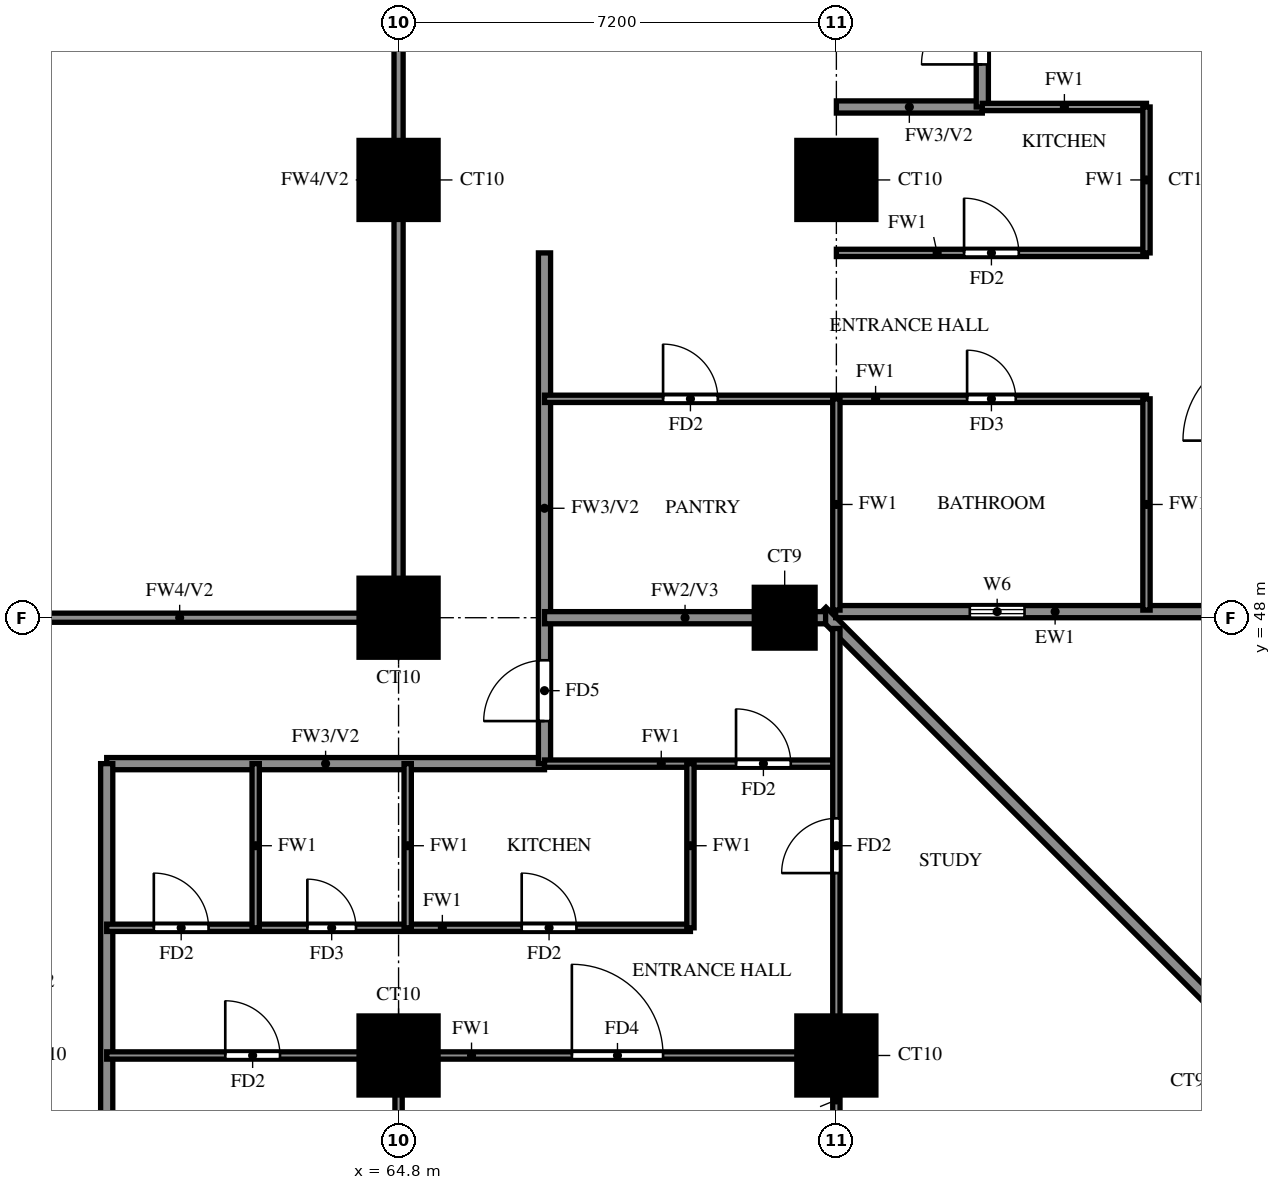
"""IFC4 building model, lengths in metres.
Left out: names, types, materials, properties, quantities, classifications, styles, units other than length and angle.
Written with IfcOpenShell. Run it as: python <this file> out.ifc"""

import sys

from ifc_helpers import new_model, si_unit, direction, frame, frame_2d, origin, origin_2d, place, context, subcontext, project, spatial, rectangle, extrude, source, transform, mapped, element, fill, save


model = new_model("IFC4")
c1 = context("Model", 3, precision=1e-05, world=origin(), true_north=direction((0.0, 1.0)))
c2 = subcontext(c1, "Body", "Model", "MODEL_VIEW")
j1 = project(units=[si_unit("LENGTHUNIT", "METRE"), si_unit("PLANEANGLEUNIT", "RADIAN")], contexts=[c1])
p1 = place(None, origin())
s1 = spatial("IfcSite", under=j1, at=p1, CompositionType="ELEMENT")
p2 = place(p1, origin())
s2 = spatial("IfcBuilding", under=s1, at=p2, CompositionType="ELEMENT")
p3 = place(p2, frame((0.0, 0.0, 86.5)))
s3 = spatial("IfcBuildingStorey", under=s2, at=p3, CompositionType="ELEMENT", Elevation=86.5)
m1 = source(origin(), c2, "Body", "SweptSolid", [
    extrude(rectangle(XDim=1.3, YDim=1.3, at=origin_2d()), origin(), (0.0, 0.0, 1.0), 3.18),
])
for number, where, z_axis, x_axis in (
    (1, (64.8, 40.8, 0.0), (0.0, 0.0, 1.0), (1.0, 0.0, 0.0)),
    (2, (72.0, 40.8, 0.0), (0.0, 0.0, 1.0), (1.0, 0.0, 0.0)),
    (3, (64.8, 48.0, 0.0), (0.0, 0.0, 1.0), (1.0, 0.0, 0.0)),
):
    element("IfcColumn", number, at=place(p3, frame(where, z_axis=z_axis, x_axis=x_axis)), inside=s3, PredefinedType="COLUMN", context=c2, shape_type="MappedRepresentation", body=[
        mapped(m1, transform((0.0, 0.0, 0.0))),
    ])
m2 = source(origin(), c2, "Body", "SweptSolid", [
    extrude(rectangle(XDim=1.0, YDim=1.0, at=origin_2d()), origin(), (0.0, 0.0, 1.0), 3.18),
])
p4 = place(p3, frame((71.15, 48.0, 0.0), z_axis=(0.0, 0.0, 1.0), x_axis=(1.0, 0.0, 0.0)))
e4 = element("IfcColumn", 4, at=p4, inside=s3, PredefinedType="COLUMN", context=c2, shape_type="MappedRepresentation", body=[
    mapped(m2, transform((0.0, 0.0, 0.0))),
])
for number, where, z_axis, x_axis in (
    (5, (64.8, 55.2, 0.0), (0.0, 0.0, 1.0), (1.0, 0.0, 0.0)),
    (6, (72.0, 55.2, 0.0), (0.0, 0.0, 1.0), (1.0, 0.0, 0.0)),
):
    element("IfcColumn", number, at=place(p3, frame(where, z_axis=z_axis, x_axis=x_axis)), inside=s3, PredefinedType="COLUMN", context=c2, shape_type="MappedRepresentation", body=[
        mapped(m1, transform((0.0, 0.0, 0.0))),
    ])
p5 = place(p3, frame((85.996, 33.863, 0.0), z_axis=(0.0, 0.0, 1.0), x_axis=(-0.707100718496, 0.707112843825, 0.0)))
e7 = element("IfcWall", 7, at=p5, inside=s3, PredefinedType="SOLIDWALL", context=c2, shape_type="SweptSolid", body=[
    extrude(rectangle(XDim=20.135, YDim=0.2, at=frame_2d((10.067, 0.0))), origin(), (0.0, 0.0, 1.0), 3.18),
])
p6 = place(p3, frame((71.989, 48.1, 0.0), z_axis=(0.0, 0.0, 1.0), x_axis=(1.0, 0.0, 0.0)))
e8 = element("IfcWall", 8, at=p6, inside=s3, PredefinedType="SOLIDWALL", context=c2, shape_type="SweptSolid", body=[
    extrude(rectangle(XDim=6.562, YDim=0.2, at=frame_2d((3.281, 0.0))), origin(), (0.0, 0.0, 1.0), 3.18),
])
p7 = place(p6, frame((2.206, 0.0, 1.5)))
e9 = element("IfcOpeningElement", 9, at=p7, cuts=e8, PredefinedType="OPENING", context=c2, shape_type="SweptSolid", body=[
    extrude(rectangle(XDim=0.9, YDim=0.9, at=frame_2d((0.45, 0.45))), frame((0.0, 0.11, 0.0), z_axis=(0.0, -1.0, 0.0), x_axis=(1.0, 0.0, 0.0)), (0.0, 0.0, 1.0), 0.22),
])
p8 = place(p3, frame((60.0, 45.6, 0.0), z_axis=(0.0, 0.0, 1.0), x_axis=(1.0, 0.0, 0.0)))
e10 = element("IfcWall", 10, at=p8, inside=s3, PredefinedType="SOLIDWALL", context=c2, shape_type="SweptSolid", body=[
    extrude(rectangle(XDim=7.2, YDim=0.2, at=frame_2d((3.6, 0.0))), origin(), (0.0, 0.0, 1.0), 3.18),
])
p9 = place(p3, frame((72.0, 56.4, 0.0), z_axis=(0.0, 0.0, 1.0), x_axis=(1.0, 0.0, 0.0)))
e11 = element("IfcWall", 11, at=p9, inside=s3, PredefinedType="SOLIDWALL", context=c2, shape_type="SweptSolid", body=[
    extrude(rectangle(XDim=2.4, YDim=0.2, at=frame_2d((1.2, 0.0))), origin(), (0.0, 0.0, 1.0), 3.18),
])
p10 = place(p3, frame((60.0, 33.725, 0.0), z_axis=(0.0, 0.0, 1.0), x_axis=(0.0, 1.0, 0.0)))
e12 = element("IfcWall", 12, at=p10, inside=s3, PredefinedType="SOLIDWALL", context=c2, shape_type="SweptSolid", body=[
    extrude(rectangle(XDim=11.875, YDim=0.2, at=frame_2d((5.938, 0.0))), origin(), (0.0, 0.0, 1.0), 2.28),
])
p11 = place(p3, frame((67.2, 45.6, 0.0), z_axis=(0.0, 0.0, 1.0), x_axis=(0.0, 1.0, 0.0)))
e13 = element("IfcWall", 13, at=p11, inside=s3, PredefinedType="SOLIDWALL", context=c2, shape_type="SweptSolid", body=[
    extrude(rectangle(XDim=8.4, YDim=0.2, at=frame_2d((4.2, 0.0))), origin(), (0.0, 0.0, 1.0), 3.18),
])
p12 = place(p11, frame((0.7, 0.0, 0.0)))
e14 = element("IfcOpeningElement", 14, at=p12, cuts=e13, PredefinedType="OPENING", context=c2, shape_type="SweptSolid", body=[
    extrude(rectangle(XDim=1.0, YDim=2.1, at=frame_2d((0.5, 1.05))), frame((0.0, 0.11, 0.0), z_axis=(0.0, -1.0, 0.0), x_axis=(1.0, 0.0, 0.0)), (0.0, 0.0, 1.0), 0.22),
])
p13 = place(p3, frame((74.4, 56.4, 0.0), z_axis=(0.0, 0.0, 1.0), x_axis=(0.0, 1.0, 0.0)))
e15 = element("IfcWall", 15, at=p13, inside=s3, PredefinedType="SOLIDWALL", context=c2, shape_type="SweptSolid", body=[
    extrude(rectangle(XDim=9.6, YDim=0.2, at=frame_2d((4.8, 0.0))), origin(), (0.0, 0.0, 1.0), 3.18),
])
p14 = place(p13, frame((0.7, 0.0, 0.0)))
e16 = element("IfcOpeningElement", 16, at=p14, cuts=e15, PredefinedType="OPENING", context=c2, shape_type="SweptSolid", body=[
    extrude(rectangle(XDim=1.0, YDim=2.1, at=frame_2d((0.5, 1.05))), frame((0.0, 0.11, 0.0), z_axis=(0.0, -1.0, 0.0), x_axis=(1.0, 0.0, 0.0)), (0.0, 0.0, 1.0), 0.22),
])
p15 = place(p13, frame((3.1, 0.0, 0.0)))
e17 = element("IfcOpeningElement", 17, at=p15, cuts=e15, PredefinedType="OPENING", context=c2, shape_type="SweptSolid", body=[
    extrude(rectangle(XDim=1.0, YDim=2.1, at=frame_2d((0.5, 1.05))), frame((0.0, 0.11, 0.0), z_axis=(0.0, -1.0, 0.0), x_axis=(1.0, 0.0, 0.0)), (0.0, 0.0, 1.0), 0.22),
])
p16 = place(p3, frame((67.2, 48.0, 0.0), z_axis=(0.0, 0.0, 1.0), x_axis=(1.0, 0.0, 0.0)))
e18 = element("IfcWall", 18, at=p16, inside=s3, PredefinedType="SOLIDWALL", context=c2, shape_type="SweptSolid", body=[
    extrude(rectangle(XDim=4.623, YDim=0.2, at=frame_2d((2.312, 0.0))), origin(), (0.0, 0.0, 1.0), 3.18),
])
p17 = place(p3, frame((60.0, 40.8, 0.0), z_axis=(0.0, 0.0, 1.0), x_axis=(1.0, 0.0, 0.0)))
e19 = element("IfcWall", 19, at=p17, inside=s3, PredefinedType="PARTITIONING", context=c2, shape_type="SweptSolid", body=[
    extrude(rectangle(XDim=12.0, YDim=0.12, at=frame_2d((6.0, 0.0))), origin(), (0.0, 0.0, 1.0), 3.18),
])
p18 = place(p17, frame((7.65, 0.0, 0.0)))
e20 = element("IfcOpeningElement", 20, at=p18, cuts=e19, PredefinedType="OPENING", context=c2, shape_type="SweptSolid", body=[
    extrude(rectangle(XDim=1.5, YDim=2.1, at=frame_2d((0.75, 1.05))), frame((0.0, 0.07, 0.0), z_axis=(0.0, -1.0, 0.0), x_axis=(1.0, 0.0, 0.0)), (0.0, 0.0, 1.0), 0.14),
])
p19 = place(p17, frame((1.95, 0.0, 0.0)))
e21 = element("IfcOpeningElement", 21, at=p19, cuts=e19, PredefinedType="OPENING", context=c2, shape_type="SweptSolid", body=[
    extrude(rectangle(XDim=0.9, YDim=2.1, at=frame_2d((0.45, 1.05))), frame((0.0, 0.07, 0.0), z_axis=(0.0, -1.0, 0.0), x_axis=(1.0, 0.0, 0.0)), (0.0, 0.0, 1.0), 0.14),
])
p20 = place(p3, frame((60.0, 42.9, 0.0), z_axis=(0.0, 0.0, 1.0), x_axis=(1.0, 0.0, 0.0)))
e22 = element("IfcWall", 22, at=p20, inside=s3, PredefinedType="PARTITIONING", context=c2, shape_type="SweptSolid", body=[
    extrude(rectangle(XDim=9.6, YDim=0.12, at=frame_2d((4.8, 0.0))), origin(), (0.0, 0.0, 1.0), 3.18),
])
p21 = place(p20, frame((6.825, 0.0, 0.0)))
e23 = element("IfcOpeningElement", 23, at=p21, cuts=e22, PredefinedType="OPENING", context=c2, shape_type="SweptSolid", body=[
    extrude(rectangle(XDim=0.9, YDim=2.1, at=frame_2d((0.45, 1.05))), frame((0.0, 0.07, 0.0), z_axis=(0.0, -1.0, 0.0), x_axis=(1.0, 0.0, 0.0)), (0.0, 0.0, 1.0), 0.14),
])
p22 = place(p20, frame((3.3, 0.0, 0.0)))
e24 = element("IfcOpeningElement", 24, at=p22, cuts=e22, PredefinedType="OPENING", context=c2, shape_type="SweptSolid", body=[
    extrude(rectangle(XDim=0.8, YDim=2.1, at=frame_2d((0.4, 1.05))), frame((0.0, 0.07, 0.0), z_axis=(0.0, -1.0, 0.0), x_axis=(1.0, 0.0, 0.0)), (0.0, 0.0, 1.0), 0.14),
])
p23 = place(p20, frame((0.775, 0.0, 0.0)))
e25 = element("IfcOpeningElement", 25, at=p23, cuts=e22, PredefinedType="OPENING", context=c2, shape_type="SweptSolid", body=[
    extrude(rectangle(XDim=0.9, YDim=2.1, at=frame_2d((0.45, 1.05))), frame((0.0, 0.07, 0.0), z_axis=(0.0, -1.0, 0.0), x_axis=(1.0, 0.0, 0.0)), (0.0, 0.0, 1.0), 0.14),
])
p24 = place(p3, frame((67.2, 45.6, 0.0), z_axis=(0.0, 0.0, 1.0), x_axis=(1.0, 0.0, 0.0)))
e26 = element("IfcWall", 26, at=p24, inside=s3, PredefinedType="PARTITIONING", context=c2, shape_type="SweptSolid", body=[
    extrude(rectangle(XDim=4.8, YDim=0.12, at=frame_2d((2.4, 0.0))), origin(), (0.0, 0.0, 1.0), 3.18),
])
p25 = place(p24, frame((3.15, 0.0, 0.0)))
e27 = element("IfcOpeningElement", 27, at=p25, cuts=e26, PredefinedType="OPENING", context=c2, shape_type="SweptSolid", body=[
    extrude(rectangle(XDim=0.9, YDim=2.1, at=frame_2d((0.45, 1.05))), frame((0.0, 0.07, 0.0), z_axis=(0.0, -1.0, 0.0), x_axis=(1.0, 0.0, 0.0)), (0.0, 0.0, 1.0), 0.14),
])
p26 = place(p3, frame((67.2, 51.6, 0.0), z_axis=(0.0, 0.0, 1.0), x_axis=(1.0, 0.0, 0.0)))
e28 = element("IfcWall", 28, at=p26, inside=s3, PredefinedType="PARTITIONING", context=c2, shape_type="SweptSolid", body=[
    extrude(rectangle(XDim=9.9, YDim=0.12, at=frame_2d((4.95, 0.0))), origin(), (0.0, 0.0, 1.0), 3.18),
])
p27 = place(p26, frame((6.95, 0.0, 0.0)))
e29 = element("IfcOpeningElement", 29, at=p27, cuts=e28, PredefinedType="OPENING", context=c2, shape_type="SweptSolid", body=[
    extrude(rectangle(XDim=0.8, YDim=2.1, at=frame_2d((0.4, 1.05))), frame((0.0, 0.07, 0.0), z_axis=(0.0, -1.0, 0.0), x_axis=(1.0, 0.0, 0.0)), (0.0, 0.0, 1.0), 0.14),
])
p28 = place(p26, frame((1.95, 0.0, 0.0)))
e30 = element("IfcOpeningElement", 30, at=p28, cuts=e28, PredefinedType="OPENING", context=c2, shape_type="SweptSolid", body=[
    extrude(rectangle(XDim=0.9, YDim=2.1, at=frame_2d((0.45, 1.05))), frame((0.0, 0.07, 0.0), z_axis=(0.0, -1.0, 0.0), x_axis=(1.0, 0.0, 0.0)), (0.0, 0.0, 1.0), 0.14),
])
p29 = place(p3, frame((72.0, 54.0, 0.0), z_axis=(0.0, 0.0, 1.0), x_axis=(1.0, 0.0, 0.0)))
e31 = element("IfcWall", 31, at=p29, inside=s3, PredefinedType="PARTITIONING", context=c2, shape_type="SweptSolid", body=[
    extrude(rectangle(XDim=5.1, YDim=0.12, at=frame_2d((2.55, 0.0))), origin(), (0.0, 0.0, 1.0), 3.18),
])
p30 = place(p29, frame((2.1, 0.0, 0.0)))
e32 = element("IfcOpeningElement", 32, at=p30, cuts=e31, PredefinedType="OPENING", context=c2, shape_type="SweptSolid", body=[
    extrude(rectangle(XDim=0.9, YDim=2.1, at=frame_2d((0.45, 1.05))), frame((0.0, 0.07, 0.0), z_axis=(0.0, -1.0, 0.0), x_axis=(1.0, 0.0, 0.0)), (0.0, 0.0, 1.0), 0.14),
])
for number, where, z_axis, x_axis in (
    (33, (74.4, 56.4, 0.0), (0.0, 0.0, 1.0), (1.0, 0.0, 0.0)),
    (34, (62.45, 42.9, 0.0), (0.0, 0.0, 1.0), (0.0, 1.0, 0.0)),
):
    element("IfcWall", number, at=place(p3, frame(where, z_axis=z_axis, x_axis=x_axis)), inside=s3, PredefinedType="PARTITIONING", context=c2, shape_type="SweptSolid", body=[
        extrude(rectangle(XDim=2.7, YDim=0.12, at=frame_2d((1.35, 0.0))), origin(), (0.0, 0.0, 1.0), 3.18),
    ])
p31 = place(p3, frame((64.8, 33.725, 0.0), z_axis=(0.0, 0.0, 1.0), x_axis=(0.0, 1.0, 0.0)))
e35 = element("IfcWall", 35, at=p31, inside=s3, PredefinedType="PARTITIONING", context=c2, shape_type="SweptSolid", body=[
    extrude(rectangle(XDim=7.075, YDim=0.12, at=frame_2d((3.538, 0.0))), origin(), (0.0, 0.0, 1.0), 3.18),
])
for number, where, z_axis, x_axis in (
    (36, (64.95, 42.9, 0.0), (0.0, 0.0, 1.0), (0.0, 1.0, 0.0)),
    (37, (69.6, 42.9, 0.0), (0.0, 0.0, 1.0), (0.0, 1.0, 0.0)),
):
    element("IfcWall", number, at=place(p3, frame(where, z_axis=z_axis, x_axis=x_axis)), inside=s3, PredefinedType="PARTITIONING", context=c2, shape_type="SweptSolid", body=[
        extrude(rectangle(XDim=2.7, YDim=0.12, at=frame_2d((1.35, 0.0))), origin(), (0.0, 0.0, 1.0), 3.18),
    ])
p32 = place(p3, frame((72.0, 33.725, 0.0), z_axis=(0.0, 0.0, 1.0), x_axis=(0.0, 1.0, 0.0)))
e38 = element("IfcWall", 38, at=p32, inside=s3, PredefinedType="PARTITIONING", context=c2, shape_type="SweptSolid", body=[
    extrude(rectangle(XDim=14.098, YDim=0.12, at=frame_2d((7.049, 0.0))), origin(), (0.0, 0.0, 1.0), 2.28),
])
p33 = place(p32, frame((10.075, 0.0, 0.0)))
e39 = element("IfcOpeningElement", 39, at=p33, cuts=e38, PredefinedType="OPENING", context=c2, shape_type="SweptSolid", body=[
    extrude(rectangle(XDim=0.9, YDim=2.1, at=frame_2d((0.45, 1.05))), frame((0.0, 0.07, 0.0), z_axis=(0.0, -1.0, 0.0), x_axis=(1.0, 0.0, 0.0)), (0.0, 0.0, 1.0), 0.14),
])
for number, where, z_axis, x_axis in (
    (40, (72.0, 48.125, 0.0), (0.0, 0.0, 1.0), (0.0, 1.0, 0.0)),
    (41, (77.1, 48.125, 0.0), (0.0, 0.0, 1.0), (0.0, 1.0, 0.0)),
):
    element("IfcWall", number, at=place(p3, frame(where, z_axis=z_axis, x_axis=x_axis)), inside=s3, PredefinedType="PARTITIONING", context=c2, shape_type="SweptSolid", body=[
        extrude(rectangle(XDim=3.475, YDim=0.12, at=frame_2d((1.738, 0.0))), origin(), (0.0, 0.0, 1.0), 3.18),
    ])
p34 = place(p3, frame((77.1, 54.0, 0.0), z_axis=(0.0, 0.0, 1.0), x_axis=(0.0, 1.0, 0.0)))
e42 = element("IfcWall", 42, at=p34, inside=s3, PredefinedType="PARTITIONING", context=c2, shape_type="SweptSolid", body=[
    extrude(rectangle(XDim=2.4, YDim=0.12, at=frame_2d((1.2, 0.0))), origin(), (0.0, 0.0, 1.0), 3.18),
])
p35 = place(p3, frame((57.6, 48.0, 0.0), z_axis=(0.0, 0.0, 1.0), x_axis=(1.0, 0.0, 0.0)))
e43 = element("IfcWall", 43, at=p35, inside=s3, PredefinedType="SOLIDWALL", context=c2, shape_type="SweptSolid", body=[
    extrude(rectangle(XDim=7.2, YDim=0.15, at=frame_2d((3.6, 0.0))), origin(), (0.0, 0.0, 1.0), 2.28),
])
p36 = place(p3, frame((64.8, 48.0, 0.0), z_axis=(0.0, 0.0, 1.0), x_axis=(0.0, 1.0, 0.0)))
e44 = element("IfcWall", 44, at=p36, inside=s3, PredefinedType="SOLIDWALL", context=c2, shape_type="SweptSolid", body=[
    extrude(rectangle(XDim=14.4, YDim=0.15, at=frame_2d((7.2, 0.0))), origin(), (0.0, 0.0, 1.0), 2.28),
])
p37 = place(p7, origin())
e45 = element("IfcWindow", 45, at=p37, inside=s3, PartitioningType="SINGLE_PANEL", PredefinedType="WINDOW", context=c2, shape_type="SweptSolid", body=[
    extrude(rectangle(XDim=0.9, YDim=0.9, at=frame_2d((0.45, 0.45))), frame((0.0, 0.03, 0.0), z_axis=(0.0, -1.0, 0.0), x_axis=(1.0, 0.0, 0.0)), (0.0, 0.0, 1.0), 0.06),
])
fill(e9, e45)
p38 = place(p14, origin())
e46 = element("IfcDoor", 46, at=p38, inside=s3, OperationType="SINGLE_SWING_RIGHT", PredefinedType="DOOR", context=c2, shape_type="SweptSolid", body=[
    extrude(rectangle(XDim=1.0, YDim=2.1, at=frame_2d((0.5, 1.05))), frame((0.0, 0.025, 0.0), z_axis=(0.0, -1.0, 0.0), x_axis=(1.0, 0.0, 0.0)), (0.0, 0.0, 1.0), 0.05),
])
fill(e16, e46)
p39 = place(p27, origin())
e47 = element("IfcDoor", 47, at=p39, inside=s3, OperationType="SINGLE_SWING_RIGHT", PredefinedType="DOOR", context=c2, shape_type="SweptSolid", body=[
    extrude(rectangle(XDim=0.8, YDim=2.1, at=frame_2d((0.4, 1.05))), frame((0.0, 0.025, 0.0), z_axis=(0.0, -1.0, 0.0), x_axis=(1.0, 0.0, 0.0)), (0.0, 0.0, 1.0), 0.05),
])
fill(e29, e47)
p40 = place(p30, origin())
e48 = element("IfcDoor", 48, at=p40, inside=s3, OperationType="SINGLE_SWING_LEFT", PredefinedType="DOOR", context=c2, shape_type="SweptSolid", body=[
    extrude(rectangle(XDim=0.9, YDim=2.1, at=frame_2d((0.45, 1.05))), frame((0.0, 0.025, 0.0), z_axis=(0.0, -1.0, 0.0), x_axis=(1.0, 0.0, 0.0)), (0.0, 0.0, 1.0), 0.05),
])
fill(e32, e48)
p41 = place(p28, origin())
e49 = element("IfcDoor", 49, at=p41, inside=s3, OperationType="SINGLE_SWING_LEFT", PredefinedType="DOOR", context=c2, shape_type="SweptSolid", body=[
    extrude(rectangle(XDim=0.9, YDim=2.1, at=frame_2d((0.45, 1.05))), frame((0.0, 0.025, 0.0), z_axis=(0.0, -1.0, 0.0), x_axis=(1.0, 0.0, 0.0)), (0.0, 0.0, 1.0), 0.05),
])
fill(e30, e49)
p42 = place(p25, origin())
e50 = element("IfcDoor", 50, at=p42, inside=s3, OperationType="SINGLE_SWING_RIGHT", PredefinedType="DOOR", context=c2, shape_type="SweptSolid", body=[
    extrude(rectangle(XDim=0.9, YDim=2.1, at=frame_2d((0.45, 1.05))), frame((0.0, 0.025, 0.0), z_axis=(0.0, -1.0, 0.0), x_axis=(1.0, 0.0, 0.0)), (0.0, 0.0, 1.0), 0.05),
])
fill(e27, e50)
p43 = place(p12, origin())
e51 = element("IfcDoor", 51, at=p43, inside=s3, OperationType="SINGLE_SWING_LEFT", PredefinedType="DOOR", context=c2, shape_type="SweptSolid", body=[
    extrude(rectangle(XDim=1.0, YDim=2.1, at=frame_2d((0.5, 1.05))), frame((0.0, 0.025, 0.0), z_axis=(0.0, -1.0, 0.0), x_axis=(1.0, 0.0, 0.0)), (0.0, 0.0, 1.0), 0.05),
])
fill(e14, e51)
p44 = place(p18, origin())
e52 = element("IfcDoor", 52, at=p44, inside=s3, OperationType="SINGLE_SWING_LEFT", PredefinedType="DOOR", context=c2, shape_type="SweptSolid", body=[
    extrude(rectangle(XDim=1.5, YDim=2.1, at=frame_2d((0.75, 1.05))), frame((0.0, 0.025, 0.0), z_axis=(0.0, -1.0, 0.0), x_axis=(1.0, 0.0, 0.0)), (0.0, 0.0, 1.0), 0.05),
])
fill(e20, e52)
p45 = place(p19, origin())
e53 = element("IfcDoor", 53, at=p45, inside=s3, OperationType="SINGLE_SWING_RIGHT", PredefinedType="DOOR", context=c2, shape_type="SweptSolid", body=[
    extrude(rectangle(XDim=0.9, YDim=2.1, at=frame_2d((0.45, 1.05))), frame((0.0, 0.025, 0.0), z_axis=(0.0, -1.0, 0.0), x_axis=(1.0, 0.0, 0.0)), (0.0, 0.0, 1.0), 0.05),
])
fill(e21, e53)
p46 = place(p21, origin())
e54 = element("IfcDoor", 54, at=p46, inside=s3, OperationType="SINGLE_SWING_LEFT", PredefinedType="DOOR", context=c2, shape_type="SweptSolid", body=[
    extrude(rectangle(XDim=0.9, YDim=2.1, at=frame_2d((0.45, 1.05))), frame((0.0, 0.025, 0.0), z_axis=(0.0, -1.0, 0.0), x_axis=(1.0, 0.0, 0.0)), (0.0, 0.0, 1.0), 0.05),
])
fill(e23, e54)
p47 = place(p22, origin())
e55 = element("IfcDoor", 55, at=p47, inside=s3, OperationType="SINGLE_SWING_LEFT", PredefinedType="DOOR", context=c2, shape_type="SweptSolid", body=[
    extrude(rectangle(XDim=0.8, YDim=2.1, at=frame_2d((0.4, 1.05))), frame((0.0, 0.025, 0.0), z_axis=(0.0, -1.0, 0.0), x_axis=(1.0, 0.0, 0.0)), (0.0, 0.0, 1.0), 0.05),
])
fill(e24, e55)
p48 = place(p23, origin())
e56 = element("IfcDoor", 56, at=p48, inside=s3, OperationType="SINGLE_SWING_RIGHT", PredefinedType="DOOR", context=c2, shape_type="SweptSolid", body=[
    extrude(rectangle(XDim=0.9, YDim=2.1, at=frame_2d((0.45, 1.05))), frame((0.0, 0.025, 0.0), z_axis=(0.0, -1.0, 0.0), x_axis=(1.0, 0.0, 0.0)), (0.0, 0.0, 1.0), 0.05),
])
fill(e25, e56)
p49 = place(p33, origin())
e57 = element("IfcDoor", 57, at=p49, inside=s3, OperationType="SINGLE_SWING_LEFT", PredefinedType="DOOR", context=c2, shape_type="SweptSolid", body=[
    extrude(rectangle(XDim=0.9, YDim=2.1, at=frame_2d((0.45, 1.05))), frame((0.0, 0.025, 0.0), z_axis=(0.0, -1.0, 0.0), x_axis=(1.0, 0.0, 0.0)), (0.0, 0.0, 1.0), 0.05),
])
fill(e39, e57)
save(model, sys.argv[1])
